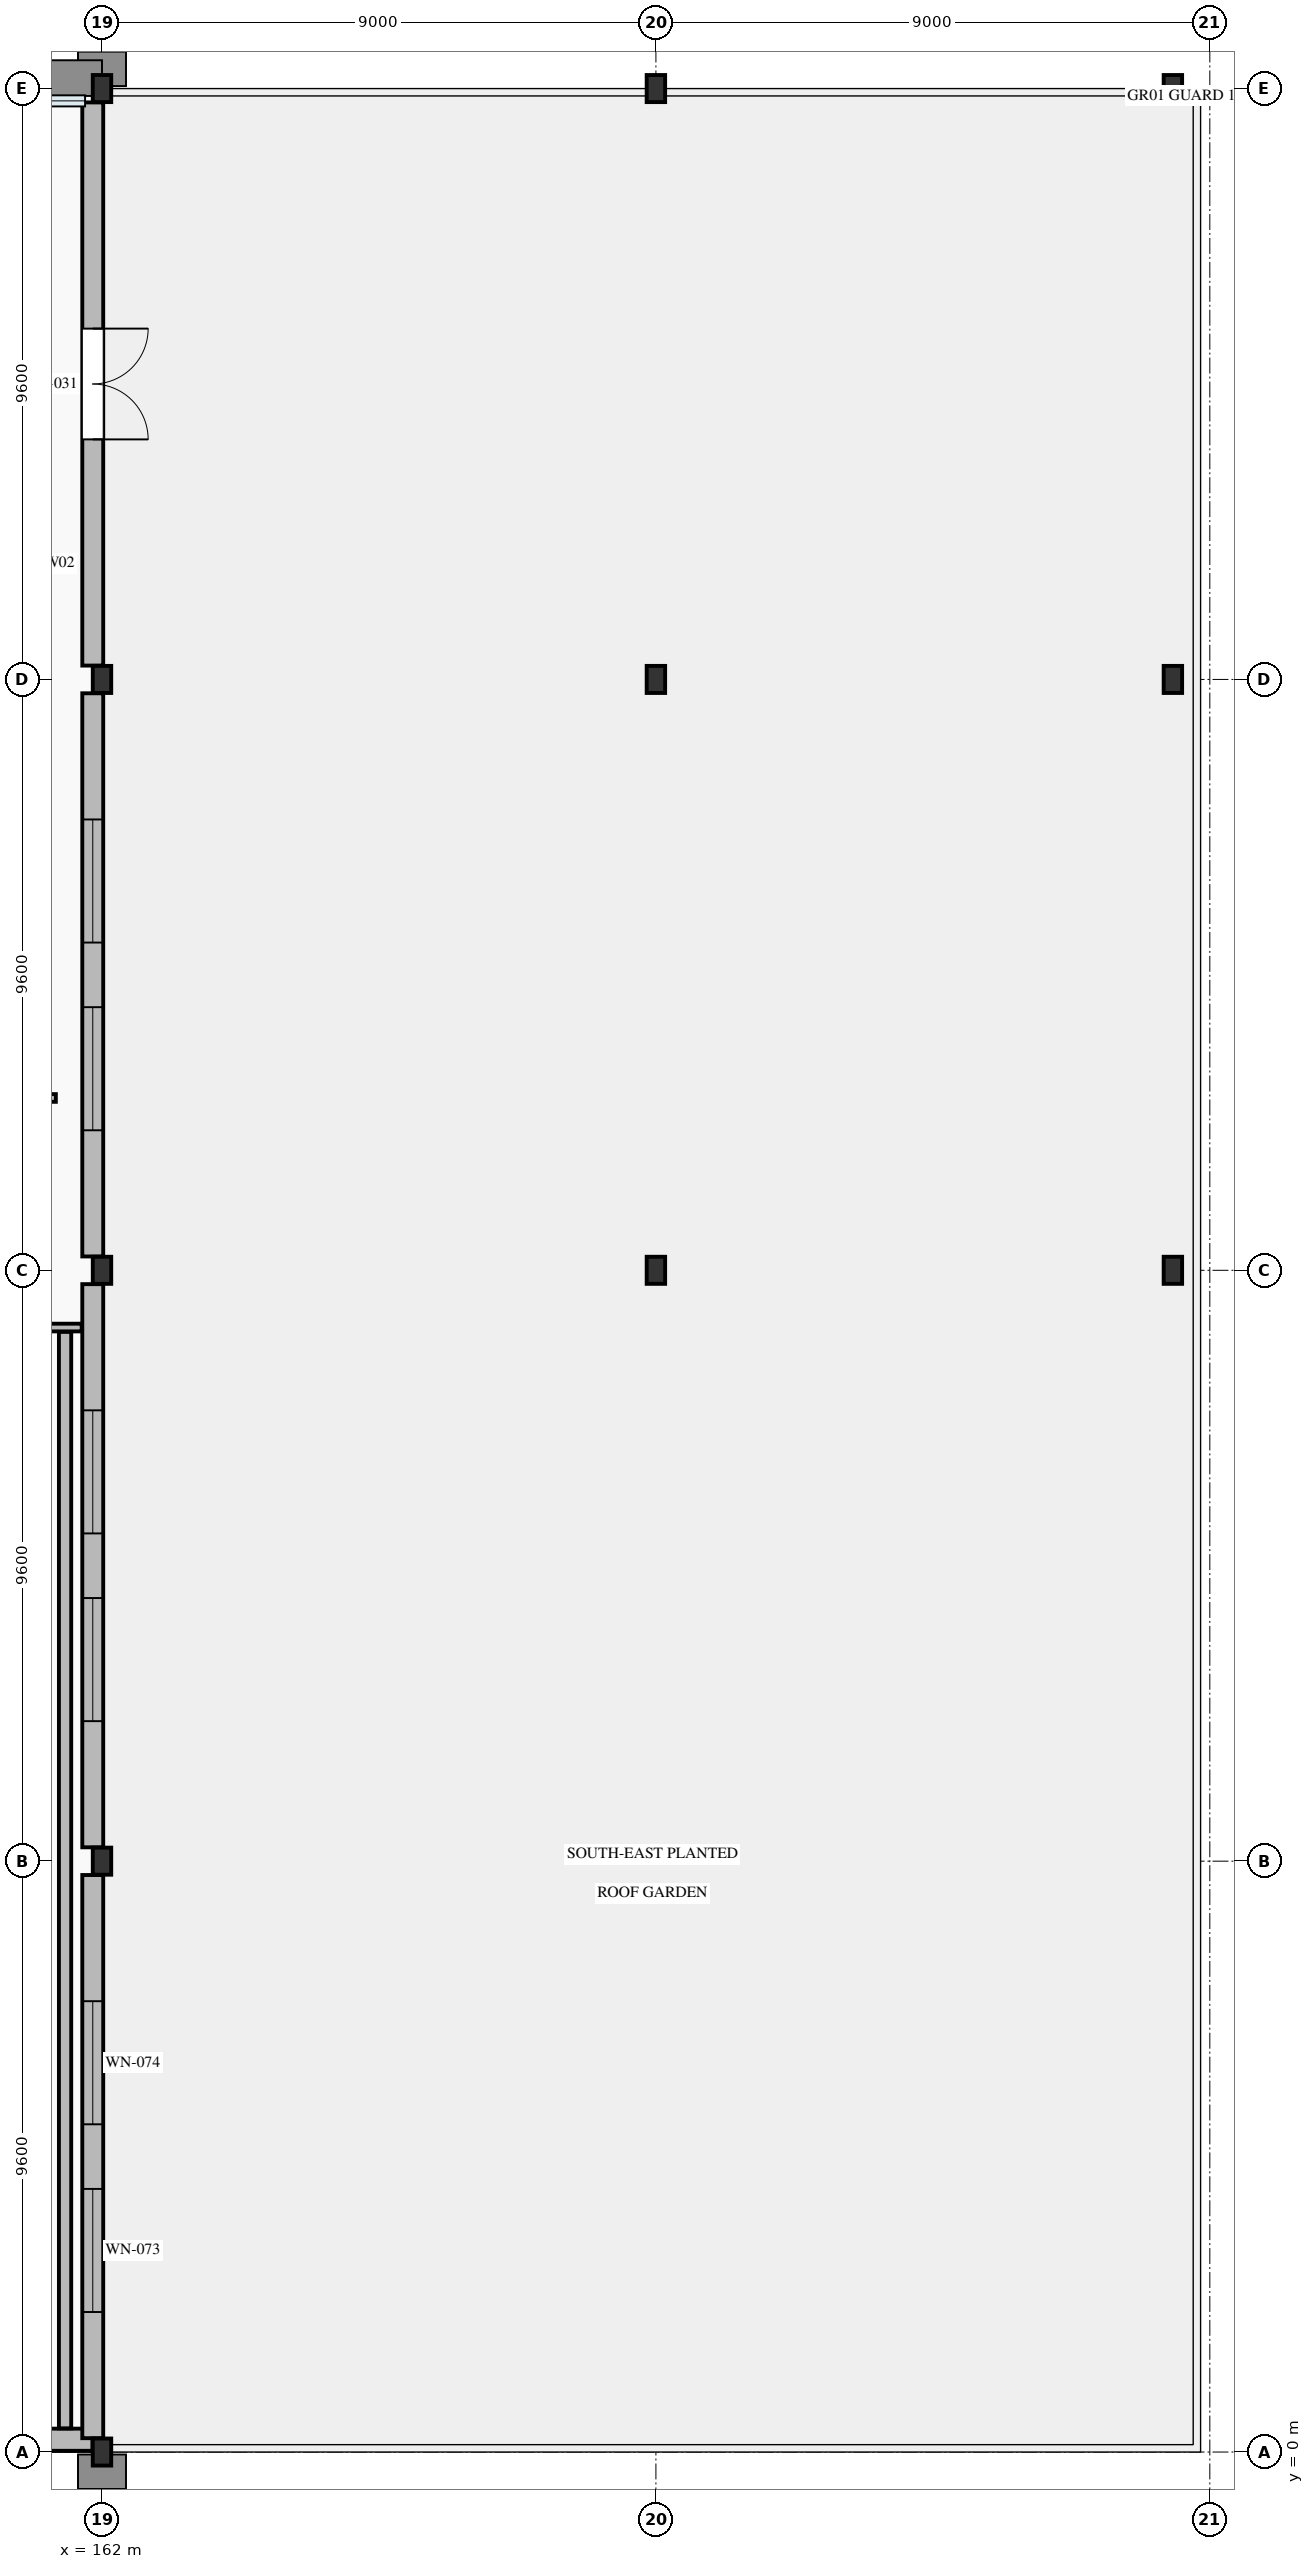
"""IFC4 building model, lengths in metres.
Left out: names, types, materials, properties, quantities, classifications, styles, units other than length and angle.
Written with IfcOpenShell. Run it as: python <this file> out.ifc"""

import sys

from ifc_helpers import new_model, si_unit, direction, frame, frame_2d, origin, origin_2d, place, context, subcontext, project, spatial, rectangle, i_section, extrude, element, fill, save


model = new_model("IFC4")
c1 = context("Model", 3, precision=1e-05, world=origin(), true_north=direction((0.0, 1.0)))
c2 = subcontext(c1, "Body", "Model", "MODEL_VIEW")
j1 = project(units=[si_unit("LENGTHUNIT", "METRE"), si_unit("PLANEANGLEUNIT", "RADIAN")], contexts=[c1])
p1 = place(None, origin())
s1 = spatial("IfcSite", under=j1, at=p1, CompositionType="ELEMENT")
p2 = place(p1, origin())
s2 = spatial("IfcBuilding", under=s1, at=p2, CompositionType="ELEMENT")
p3 = place(p2, frame((0.0, 0.0, 10.8)))
s3 = spatial("IfcBuildingStorey", under=s2, at=p3, CompositionType="ELEMENT", Elevation=10.8)
for number, where, z_axis, x_axis in (
    (1, (162.0, 0.0, 0.0), (0.0, 0.0, 1.0), (1.0, 0.0, 0.0)),
    (2, (162.0, 9.6, 0.0), (0.0, 0.0, 1.0), (1.0, 0.0, 0.0)),
    (3, (162.0, 19.2, 0.0), (0.0, 0.0, 1.0), (1.0, 0.0, 0.0)),
    (4, (162.0, 28.8, 0.0), (0.0, 0.0, 1.0), (1.0, 0.0, 0.0)),
    (5, (162.0, 38.4, 0.0), (0.0, 0.0, 1.0), (1.0, 0.0, 0.0)),
    (6, (171.0, 19.2, 0.0), (0.0, 0.0, 1.0), (1.0, 0.0, 0.0)),
    (7, (171.0, 28.8, 0.0), (0.0, 0.0, 1.0), (1.0, 0.0, 0.0)),
    (8, (171.0, 38.4, 0.0), (0.0, 0.0, 1.0), (1.0, 0.0, 0.0)),
    (9, (179.4, 19.2, 0.0), (0.0, 0.0, 1.0), (1.0, 0.0, 0.0)),
    (10, (179.4, 28.8, 0.0), (0.0, 0.0, 1.0), (1.0, 0.0, 0.0)),
    (11, (179.4, 38.4, 0.0), (0.0, 0.0, 1.0), (1.0, 0.0, 0.0)),
):
    element("IfcColumn", number, at=place(p3, frame(where, z_axis=z_axis, x_axis=x_axis)), inside=s3, PredefinedType="COLUMN", context=c2, shape_type="SweptSolid", body=[
        extrude(i_section(OverallWidth=0.3, OverallDepth=0.44, WebThickness=0.011, FlangeThickness=0.021, FilletRadius=0.027, at=origin_2d()), origin(), (0.0, 0.0, 1.0), 4.2),
    ])
p4 = place(p3, frame((153.155, 0.2, 0.0), z_axis=(0.0, 0.0, 1.0), x_axis=(1.0, 0.0, 0.0)))
e12 = element("IfcWall", 12, at=p4, inside=s3, PredefinedType="SOLIDWALL", context=c2, shape_type="SweptSolid", body=[
    extrude(rectangle(XDim=8.69, YDim=0.36, at=frame_2d((4.345, 0.0))), origin(), (0.0, 0.0, 1.0), 3.665),
])
p5 = place(p4, frame((2.097, 0.0, 0.95)))
e13 = element("IfcOpeningElement", 13, at=p5, cuts=e12, PredefinedType="OPENING", context=c2, shape_type="SweptSolid", body=[
    extrude(rectangle(XDim=1.6, YDim=2.2, at=frame_2d((0.8, 1.1))), frame((0.0, 0.195, 0.0), z_axis=(0.0, -1.0, 0.0), x_axis=(1.0, 0.0, 0.0)), (0.0, 0.0, 1.0), 0.39),
])
p6 = place(p4, frame((4.993, 0.0, 0.95)))
e14 = element("IfcOpeningElement", 14, at=p6, cuts=e12, PredefinedType="OPENING", context=c2, shape_type="SweptSolid", body=[
    extrude(rectangle(XDim=1.6, YDim=2.2, at=frame_2d((0.8, 1.1))), frame((0.0, 0.195, 0.0), z_axis=(0.0, -1.0, 0.0), x_axis=(1.0, 0.0, 0.0)), (0.0, 0.0, 1.0), 0.39),
])
p7 = place(p3, frame((161.85, 0.225, 0.0), z_axis=(0.0, 0.0, 1.0), x_axis=(0.0, 1.0, 0.0)))
e15 = element("IfcWall", 15, at=p7, inside=s3, PredefinedType="SOLIDWALL", context=c2, shape_type="SweptSolid", body=[
    extrude(rectangle(XDim=9.15, YDim=0.34, at=frame_2d((4.575, 0.0))), origin(), (0.0, 0.0, 1.0), 3.645),
])
p8 = place(p7, frame((2.05, 0.0, 0.95)))
e16 = element("IfcOpeningElement", 16, at=p8, cuts=e15, PredefinedType="OPENING", context=c2, shape_type="SweptSolid", body=[
    extrude(rectangle(XDim=2.0, YDim=2.4, at=frame_2d((1.0, 1.2))), frame((0.0, 0.185, 0.0), z_axis=(0.0, -1.0, 0.0), x_axis=(1.0, 0.0, 0.0)), (0.0, 0.0, 1.0), 0.37),
])
p9 = place(p7, frame((5.1, 0.0, 0.95)))
e17 = element("IfcOpeningElement", 17, at=p9, cuts=e15, PredefinedType="OPENING", context=c2, shape_type="SweptSolid", body=[
    extrude(rectangle(XDim=2.0, YDim=2.4, at=frame_2d((1.0, 1.2))), frame((0.0, 0.185, 0.0), z_axis=(0.0, -1.0, 0.0), x_axis=(1.0, 0.0, 0.0)), (0.0, 0.0, 1.0), 0.37),
])
p10 = place(p3, frame((161.85, 9.825, 0.0), z_axis=(0.0, 0.0, 1.0), x_axis=(0.0, 1.0, 0.0)))
e18 = element("IfcWall", 18, at=p10, inside=s3, PredefinedType="SOLIDWALL", context=c2, shape_type="SweptSolid", body=[
    extrude(rectangle(XDim=9.15, YDim=0.34, at=frame_2d((4.575, 0.0))), origin(), (0.0, 0.0, 1.0), 3.645),
])
p11 = place(p10, frame((2.05, 0.0, 0.95)))
e19 = element("IfcOpeningElement", 19, at=p11, cuts=e18, PredefinedType="OPENING", context=c2, shape_type="SweptSolid", body=[
    extrude(rectangle(XDim=2.0, YDim=2.4, at=frame_2d((1.0, 1.2))), frame((0.0, 0.185, 0.0), z_axis=(0.0, -1.0, 0.0), x_axis=(1.0, 0.0, 0.0)), (0.0, 0.0, 1.0), 0.37),
])
p12 = place(p10, frame((5.1, 0.0, 0.95)))
e20 = element("IfcOpeningElement", 20, at=p12, cuts=e18, PredefinedType="OPENING", context=c2, shape_type="SweptSolid", body=[
    extrude(rectangle(XDim=2.0, YDim=2.4, at=frame_2d((1.0, 1.2))), frame((0.0, 0.185, 0.0), z_axis=(0.0, -1.0, 0.0), x_axis=(1.0, 0.0, 0.0)), (0.0, 0.0, 1.0), 0.37),
])
p13 = place(p3, frame((161.85, 19.425, 0.0), z_axis=(0.0, 0.0, 1.0), x_axis=(0.0, 1.0, 0.0)))
e21 = element("IfcWall", 21, at=p13, inside=s3, PredefinedType="SOLIDWALL", context=c2, shape_type="SweptSolid", body=[
    extrude(rectangle(XDim=9.15, YDim=0.34, at=frame_2d((4.575, 0.0))), origin(), (0.0, 0.0, 1.0), 3.645),
])
p14 = place(p13, frame((2.05, 0.0, 0.95)))
e22 = element("IfcOpeningElement", 22, at=p14, cuts=e21, PredefinedType="OPENING", context=c2, shape_type="SweptSolid", body=[
    extrude(rectangle(XDim=2.0, YDim=2.4, at=frame_2d((1.0, 1.2))), frame((0.0, 0.185, 0.0), z_axis=(0.0, -1.0, 0.0), x_axis=(1.0, 0.0, 0.0)), (0.0, 0.0, 1.0), 0.37),
])
p15 = place(p13, frame((5.1, 0.0, 0.95)))
e23 = element("IfcOpeningElement", 23, at=p15, cuts=e21, PredefinedType="OPENING", context=c2, shape_type="SweptSolid", body=[
    extrude(rectangle(XDim=2.0, YDim=2.4, at=frame_2d((1.0, 1.2))), frame((0.0, 0.185, 0.0), z_axis=(0.0, -1.0, 0.0), x_axis=(1.0, 0.0, 0.0)), (0.0, 0.0, 1.0), 0.37),
])
p16 = place(p3, frame((161.85, 29.025, 0.0), z_axis=(0.0, 0.0, 1.0), x_axis=(0.0, 1.0, 0.0)))
e24 = element("IfcWall", 24, at=p16, inside=s3, PredefinedType="SOLIDWALL", context=c2, shape_type="SweptSolid", body=[
    extrude(rectangle(XDim=9.15, YDim=0.34, at=frame_2d((4.575, 0.0))), origin(), (0.0, 0.0, 1.0), 3.645),
])
p17 = place(p16, frame((3.675, 0.0, 0.0)))
e25 = element("IfcOpeningElement", 25, at=p17, cuts=e24, PredefinedType="OPENING", context=c2, shape_type="SweptSolid", body=[
    extrude(rectangle(XDim=1.8, YDim=2.3, at=frame_2d((0.9, 1.15))), frame((0.0, 0.185, 0.0), z_axis=(0.0, -1.0, 0.0), x_axis=(1.0, 0.0, 0.0)), (0.0, 0.0, 1.0), 0.37),
])
p18 = place(p3, frame((145.55, 22.0, 0.0), z_axis=(0.0, 0.0, 1.0), x_axis=(1.0, 0.0, 0.0)))
e26 = element("IfcWall", 26, at=p18, inside=s3, PredefinedType="PARTITIONING", context=c2, shape_type="SweptSolid", body=[
    extrude(rectangle(XDim=15.7, YDim=0.125, at=frame_2d((7.85, 0.0))), origin(), (0.0, 0.0, 1.0), 3.94),
])
p19 = place(p18, frame((7.05, 0.0, 0.0)))
e27 = element("IfcOpeningElement", 27, at=p19, cuts=e26, PredefinedType="OPENING", context=c2, shape_type="SweptSolid", body=[
    extrude(rectangle(XDim=1.6, YDim=2.25, at=frame_2d((0.8, 1.125))), frame((0.0, 0.077, 0.0), z_axis=(0.0, -1.0, 0.0), x_axis=(1.0, 0.0, 0.0)), (0.0, 0.0, 1.0), 0.155),
])
p20 = place(p3, frame((161.4, 0.385, 0.0), z_axis=(0.0, 0.0, 1.0), x_axis=(0.0, 1.0, 0.0)))
e28 = element("IfcWall", 28, at=p20, inside=s3, PredefinedType="PARTITIONING", context=c2, shape_type="SweptSolid", body=[
    extrude(rectangle(XDim=17.815, YDim=0.2, at=frame_2d((8.907, 0.0))), origin(), (0.0, 0.0, 1.0), 3.94),
])
p21 = place(p3, frame((160.81, 18.27, 0.0), z_axis=(0.0, 0.0, 1.0), x_axis=(1.0, 0.0, 0.0)))
e29 = element("IfcWall", 29, at=p21, inside=s3, PredefinedType="PARTITIONING", context=c2, shape_type="SweptSolid", body=[
    extrude(rectangle(XDim=0.86, YDim=0.125, at=frame_2d((0.43, 0.0))), origin(), (0.0, 0.0, 1.0), 3.94),
])
p22 = place(p8, origin())
e30 = element("IfcWindow", 30, at=p22, inside=s3, PartitioningType="SINGLE_PANEL", PredefinedType="WINDOW", context=c2, shape_type="SweptSolid", body=[
    extrude(rectangle(XDim=2.0, YDim=2.4, at=frame_2d((1.0, 1.2))), frame((0.0, 0.03, 0.0), z_axis=(0.0, -1.0, 0.0), x_axis=(1.0, 0.0, 0.0)), (0.0, 0.0, 1.0), 0.06),
])
fill(e16, e30)
p23 = place(p9, origin())
e31 = element("IfcWindow", 31, at=p23, inside=s3, PartitioningType="SINGLE_PANEL", PredefinedType="WINDOW", context=c2, shape_type="SweptSolid", body=[
    extrude(rectangle(XDim=2.0, YDim=2.4, at=frame_2d((1.0, 1.2))), frame((0.0, 0.03, 0.0), z_axis=(0.0, -1.0, 0.0), x_axis=(1.0, 0.0, 0.0)), (0.0, 0.0, 1.0), 0.06),
])
fill(e17, e31)
p24 = place(p11, origin())
e32 = element("IfcWindow", 32, at=p24, inside=s3, PartitioningType="SINGLE_PANEL", PredefinedType="WINDOW", context=c2, shape_type="SweptSolid", body=[
    extrude(rectangle(XDim=2.0, YDim=2.4, at=frame_2d((1.0, 1.2))), frame((0.0, 0.03, 0.0), z_axis=(0.0, -1.0, 0.0), x_axis=(1.0, 0.0, 0.0)), (0.0, 0.0, 1.0), 0.06),
])
fill(e19, e32)
p25 = place(p12, origin())
e33 = element("IfcWindow", 33, at=p25, inside=s3, PartitioningType="SINGLE_PANEL", PredefinedType="WINDOW", context=c2, shape_type="SweptSolid", body=[
    extrude(rectangle(XDim=2.0, YDim=2.4, at=frame_2d((1.0, 1.2))), frame((0.0, 0.03, 0.0), z_axis=(0.0, -1.0, 0.0), x_axis=(1.0, 0.0, 0.0)), (0.0, 0.0, 1.0), 0.06),
])
fill(e20, e33)
p26 = place(p14, origin())
e34 = element("IfcWindow", 34, at=p26, inside=s3, PartitioningType="SINGLE_PANEL", PredefinedType="WINDOW", context=c2, shape_type="SweptSolid", body=[
    extrude(rectangle(XDim=2.0, YDim=2.4, at=frame_2d((1.0, 1.2))), frame((0.0, 0.03, 0.0), z_axis=(0.0, -1.0, 0.0), x_axis=(1.0, 0.0, 0.0)), (0.0, 0.0, 1.0), 0.06),
])
fill(e22, e34)
p27 = place(p15, origin())
e35 = element("IfcWindow", 35, at=p27, inside=s3, PartitioningType="SINGLE_PANEL", PredefinedType="WINDOW", context=c2, shape_type="SweptSolid", body=[
    extrude(rectangle(XDim=2.0, YDim=2.4, at=frame_2d((1.0, 1.2))), frame((0.0, 0.03, 0.0), z_axis=(0.0, -1.0, 0.0), x_axis=(1.0, 0.0, 0.0)), (0.0, 0.0, 1.0), 0.06),
])
fill(e23, e35)
p28 = place(p17, frame((1.8, 0.0, 0.0), z_axis=(0.0, 0.0, 1.0), x_axis=(-1.0, 0.0, 0.0)))
e36 = element("IfcDoor", 36, at=p28, inside=s3, OperationType="DOUBLE_DOOR_SINGLE_SWING", PredefinedType="DOOR", context=c2, shape_type="SweptSolid", body=[
    extrude(rectangle(XDim=1.8, YDim=2.3, at=frame_2d((0.9, 1.15))), frame((0.0, 0.025, 0.0), z_axis=(0.0, -1.0, 0.0), x_axis=(1.0, 0.0, 0.0)), (0.0, 0.0, 1.0), 0.05),
])
fill(e25, e36)
save(model, sys.argv[1])
